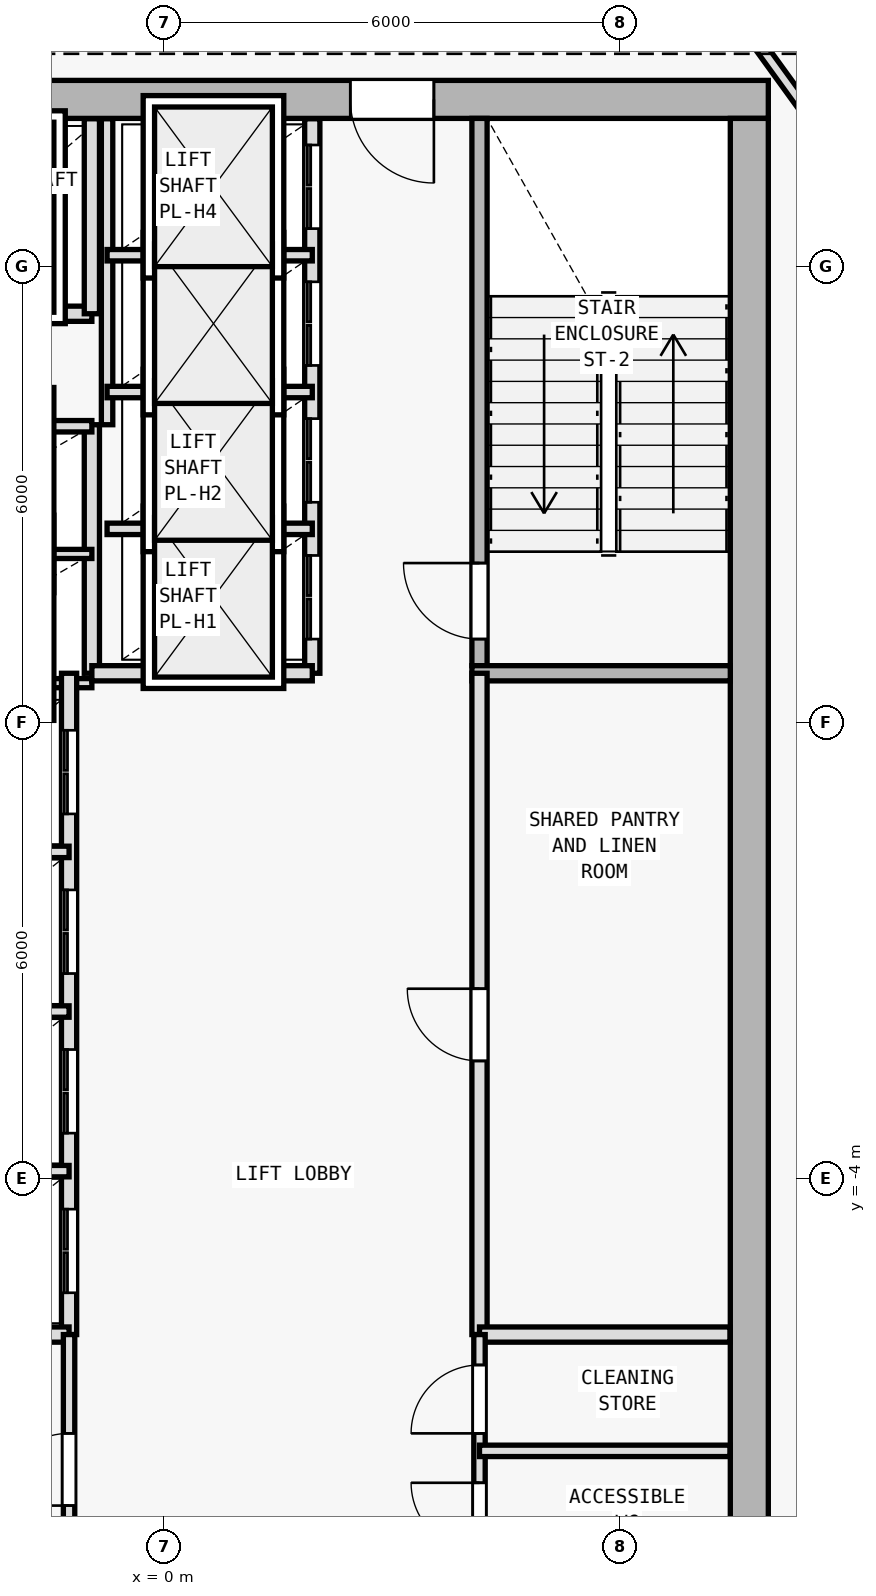
"""IFC4 building model, lengths in metres.
Left out: names, types, materials, properties, quantities, classifications, styles, units other than length and angle.
Written with IfcOpenShell. Run it as: python <this file> out.ifc"""

import sys

from ifc_helpers import new_model, si_unit, direction, frame, frame_2d, origin, origin_2d, place, context, subcontext, project, spatial, rectangle, i_section, extrude, element, fill, save


model = new_model("IFC4")
c1 = context("Model", 3, precision=1e-05, world=origin(), true_north=direction((0.0, 1.0)))
c2 = subcontext(c1, "Body", "Model", "MODEL_VIEW")
j1 = project(units=[si_unit("LENGTHUNIT", "METRE"), si_unit("PLANEANGLEUNIT", "RADIAN")], contexts=[c1])
p1 = place(None, origin())
s1 = spatial("IfcSite", under=j1, at=p1, CompositionType="ELEMENT")
p2 = place(p1, origin())
s2 = spatial("IfcBuilding", under=s1, at=p2, CompositionType="ELEMENT")
p3 = place(p2, frame((0.0, 0.0, 190.2)))
s3 = spatial("IfcBuildingStorey", under=s2, at=p3, CompositionType="ELEMENT", Elevation=190.2)
for number, where, z_axis, x_axis in (
    (1, (7.7, 10.2, 0.0), (0.0, 0.0, 1.0), (1.0, 0.0, 0.0)),
    (2, (7.7, 0.4, 0.0), (0.0, 0.0, 1.0), (1.0, 0.0, 0.0)),
):
    element("IfcColumn", number, at=place(p3, frame(where, z_axis=z_axis, x_axis=x_axis)), inside=s3, PredefinedType="COLUMN", context=c2, shape_type="SweptSolid", body=[
        extrude(i_section(OverallWidth=0.404, OverallDepth=0.407, WebThickness=0.017, FlangeThickness=0.028, FilletRadius=0.015, at=origin_2d()), origin(), (0.0, 0.0, 1.0), 4.5),
    ])
p4 = place(p3, frame((7.95, 10.2, 0.0), z_axis=(0.0, 0.0, 1.0), x_axis=(-1.0, 0.0, 0.0)))
e3 = element("IfcWall", 3, at=p4, inside=s3, PredefinedType="SHEAR", context=c2, shape_type="SweptSolid", body=[
    extrude(rectangle(XDim=15.9, YDim=0.5, at=frame_2d((7.95, 0.0))), origin(), (0.0, 0.0, 1.0), 4.25),
])
p5 = place(p4, frame((4.4, 0.0, 0.0)))
e4 = element("IfcOpeningElement", 4, at=p5, cuts=e3, PredefinedType="OPENING", context=c2, shape_type="SweptSolid", body=[
    extrude(rectangle(XDim=1.1, YDim=2.15, at=frame_2d((0.55, 1.075))), frame((0.0, 0.26, 0.0), z_axis=(0.0, -1.0, 0.0), x_axis=(1.0, 0.0, 0.0)), (0.0, 0.0, 1.0), 0.52),
])
p6 = place(p3, frame((7.7, 9.95, 0.0), z_axis=(0.0, 0.0, 1.0), x_axis=(0.0, -1.0, 0.0)))
e5 = element("IfcWall", 5, at=p6, inside=s3, PredefinedType="SHEAR", context=c2, shape_type="SweptSolid", body=[
    extrude(rectangle(XDim=19.1, YDim=0.5, at=frame_2d((9.55, 0.0))), origin(), (0.0, 0.0, 1.0), 4.25),
])
p7 = place(p3, frame((4.15, 2.75, 0.0), z_axis=(0.0, 0.0, 1.0), x_axis=(0.0, 1.0, 0.0)))
e6 = element("IfcWall", 6, at=p7, inside=s3, PredefinedType="SOLIDWALL", context=c2, shape_type="SweptSolid", body=[
    extrude(rectangle(XDim=7.2, YDim=0.2, at=frame_2d((3.6, 0.0))), origin(), (0.0, 0.0, 1.0), 4.25),
])
p8 = place(p7, frame((0.35, 0.0, 0.0)))
e7 = element("IfcOpeningElement", 7, at=p8, cuts=e6, PredefinedType="OPENING", context=c2, shape_type="SweptSolid", body=[
    extrude(rectangle(XDim=1.0, YDim=2.15, at=frame_2d((0.5, 1.075))), frame((0.0, 0.11, 0.0), z_axis=(0.0, -1.0, 0.0), x_axis=(1.0, 0.0, 0.0)), (0.0, 0.0, 1.0), 0.22),
])
p9 = place(p3, frame((4.05, 2.65, 0.0), z_axis=(0.0, 0.0, 1.0), x_axis=(1.0, 0.0, 0.0)))
e8 = element("IfcWall", 8, at=p9, inside=s3, PredefinedType="SOLIDWALL", context=c2, shape_type="SweptSolid", body=[
    extrude(rectangle(XDim=3.4, YDim=0.2, at=frame_2d((1.7, 0.0))), origin(), (0.0, 0.0, 1.0), 4.25),
])
p10 = place(p3, frame((-0.95, 2.65, 0.0), z_axis=(0.0, 0.0, 1.0), x_axis=(0.0, 1.0, 0.0)))
e9 = element("IfcWall", 9, at=p10, inside=s3, PredefinedType="SOLIDWALL", context=c2, shape_type="SweptSolid", body=[
    extrude(rectangle(XDim=3.27, YDim=0.2, at=frame_2d((1.635, 0.0))), origin(), (0.0, 0.0, 1.0), 4.25),
])
for number, where, z_axis, x_axis in (
    (10, (-3.85, 2.52, 0.0), (0.0, 0.0, 1.0), (1.0, 0.0, 0.0)),
    (11, (-3.85, 4.22, 0.0), (0.0, 0.0, 1.0), (1.0, 0.0, 0.0)),
):
    element("IfcWall", number, at=place(p3, frame(where, z_axis=z_axis, x_axis=x_axis)), inside=s3, PredefinedType="PARTITIONING", context=c2, shape_type="SweptSolid", body=[
        extrude(rectangle(XDim=2.9, YDim=0.12, at=frame_2d((1.45, 0.0))), origin(), (0.0, 0.0, 1.0), 4.25),
    ])
p11 = place(p3, frame((-3.85, 5.9, 0.0), z_axis=(0.0, 0.0, 1.0), x_axis=(1.0, 0.0, 0.0)))
e12 = element("IfcWall", 12, at=p11, inside=s3, PredefinedType="PARTITIONING", context=c2, shape_type="SweptSolid", body=[
    extrude(rectangle(XDim=2.9, YDim=0.15, at=frame_2d((1.45, 0.0))), origin(), (0.0, 0.0, 1.0), 4.25),
])
p12 = place(p3, frame((-3.85, 7.38, 0.0), z_axis=(0.0, 0.0, 1.0), x_axis=(1.0, 0.0, 0.0)))
e13 = element("IfcWall", 13, at=p12, inside=s3, PredefinedType="SOLIDWALL", context=c2, shape_type="SweptSolid", body=[
    extrude(rectangle(XDim=2.9, YDim=0.2, at=frame_2d((1.45, 0.0))), origin(), (0.0, 0.0, 1.0), 4.25),
])
p13 = place(p12, frame((0.85, 0.0, 0.0)))
e14 = element("IfcOpeningElement", 14, at=p13, cuts=e13, PredefinedType="OPENING", context=c2, shape_type="SweptSolid", body=[
    extrude(rectangle(XDim=1.2, YDim=2.2, at=frame_2d((0.6, 1.1))), frame((0.0, 0.11, 0.0), z_axis=(0.0, -1.0, 0.0), x_axis=(1.0, 0.0, 0.0)), (0.0, 0.0, 1.0), 0.22),
])
p14 = place(p3, frame((-0.95, 7.38, 0.0), z_axis=(0.0, 0.0, 1.0), x_axis=(0.0, 1.0, 0.0)))
e15 = element("IfcWall", 15, at=p14, inside=s3, PredefinedType="SOLIDWALL", context=c2, shape_type="SweptSolid", body=[
    extrude(rectangle(XDim=2.565, YDim=0.2, at=frame_2d((1.283, 0.0))), origin(), (0.0, 0.0, 1.0), 4.25),
])
p15 = place(p3, frame((4.15, -6.05, 0.0), z_axis=(0.0, 0.0, 1.0), x_axis=(0.0, 1.0, 0.0)))
e16 = element("IfcWall", 16, at=p15, inside=s3, PredefinedType="SOLIDWALL", context=c2, shape_type="SweptSolid", body=[
    extrude(rectangle(XDim=8.7, YDim=0.2, at=frame_2d((4.35, 0.0))), origin(), (0.0, 0.0, 1.0), 4.25),
])
p16 = place(p15, frame((3.6, 0.0, 0.0)))
e17 = element("IfcOpeningElement", 17, at=p16, cuts=e16, PredefinedType="OPENING", context=c2, shape_type="SweptSolid", body=[
    extrude(rectangle(XDim=0.95, YDim=2.1, at=frame_2d((0.475, 1.05))), frame((0.0, 0.11, 0.0), z_axis=(0.0, -1.0, 0.0), x_axis=(1.0, 0.0, 0.0)), (0.0, 0.0, 1.0), 0.22),
])
p17 = place(p3, frame((-1.25, -6.05, 0.0), z_axis=(0.0, 0.0, 1.0), x_axis=(0.0, 1.0, 0.0)))
e18 = element("IfcWall", 18, at=p17, inside=s3, PredefinedType="SOLIDWALL", context=c2, shape_type="SweptSolid", body=[
    extrude(rectangle(XDim=8.7, YDim=0.2, at=frame_2d((4.35, 0.0))), origin(), (0.0, 0.0, 1.0), 4.25),
])
p18 = place(p17, frame((0.55, 0.0, 0.0)))
e19 = element("IfcOpeningElement", 19, at=p18, cuts=e18, PredefinedType="OPENING", context=c2, shape_type="SweptSolid", body=[
    extrude(rectangle(XDim=1.1, YDim=2.15, at=frame_2d((0.55, 1.075))), frame((0.0, 0.11, 0.0), z_axis=(0.0, -1.0, 0.0), x_axis=(1.0, 0.0, 0.0)), (0.0, 0.0, 1.0), 0.22),
])
p19 = place(p17, frame((2.65, 0.0, 0.0)))
e20 = element("IfcOpeningElement", 20, at=p19, cuts=e18, PredefinedType="OPENING", context=c2, shape_type="SweptSolid", body=[
    extrude(rectangle(XDim=1.1, YDim=2.15, at=frame_2d((0.55, 1.075))), frame((0.0, 0.11, 0.0), z_axis=(0.0, -1.0, 0.0), x_axis=(1.0, 0.0, 0.0)), (0.0, 0.0, 1.0), 0.22),
])
p20 = place(p17, frame((4.75, 0.0, 0.0)))
e21 = element("IfcOpeningElement", 21, at=p20, cuts=e18, PredefinedType="OPENING", context=c2, shape_type="SweptSolid", body=[
    extrude(rectangle(XDim=1.1, YDim=2.15, at=frame_2d((0.55, 1.075))), frame((0.0, 0.11, 0.0), z_axis=(0.0, -1.0, 0.0), x_axis=(1.0, 0.0, 0.0)), (0.0, 0.0, 1.0), 0.22),
])
p21 = place(p17, frame((6.85, 0.0, 0.0)))
e22 = element("IfcOpeningElement", 22, at=p21, cuts=e18, PredefinedType="OPENING", context=c2, shape_type="SweptSolid", body=[
    extrude(rectangle(XDim=1.1, YDim=2.15, at=frame_2d((0.55, 1.075))), frame((0.0, 0.11, 0.0), z_axis=(0.0, -1.0, 0.0), x_axis=(1.0, 0.0, 0.0)), (0.0, 0.0, 1.0), 0.22),
])
for number, where, z_axis, x_axis in (
    (23, (-4.15, -3.9, 0.0), (0.0, 0.0, 1.0), (1.0, 0.0, 0.0)),
    (24, (-4.15, -1.8, 0.0), (0.0, 0.0, 1.0), (1.0, 0.0, 0.0)),
    (25, (-4.15, 0.3, 0.0), (0.0, 0.0, 1.0), (1.0, 0.0, 0.0)),
):
    element("IfcWall", number, at=place(p3, frame(where, z_axis=z_axis, x_axis=x_axis)), inside=s3, PredefinedType="PARTITIONING", context=c2, shape_type="SweptSolid", body=[
        extrude(rectangle(XDim=2.9, YDim=0.15, at=frame_2d((1.45, 0.0))), origin(), (0.0, 0.0, 1.0), 4.25),
    ])
p22 = place(p3, frame((1.95, 2.65, 0.0), z_axis=(0.0, 0.0, 1.0), x_axis=(0.0, 1.0, 0.0)))
e26 = element("IfcWall", 26, at=p22, inside=s3, PredefinedType="SOLIDWALL", context=c2, shape_type="SweptSolid", body=[
    extrude(rectangle(XDim=7.295, YDim=0.2, at=frame_2d((3.647, 0.0))), origin(), (0.0, 0.0, 1.0), 4.25),
])
p23 = place(p22, frame((0.45, 0.0, 0.0)))
e27 = element("IfcOpeningElement", 27, at=p23, cuts=e26, PredefinedType="OPENING", context=c2, shape_type="SweptSolid", body=[
    extrude(rectangle(XDim=1.1, YDim=2.15, at=frame_2d((0.55, 1.075))), frame((0.0, 0.11, 0.0), z_axis=(0.0, -1.0, 0.0), x_axis=(1.0, 0.0, 0.0)), (0.0, 0.0, 1.0), 0.22),
])
p24 = place(p22, frame((2.25, 0.0, 0.0)))
e28 = element("IfcOpeningElement", 28, at=p24, cuts=e26, PredefinedType="OPENING", context=c2, shape_type="SweptSolid", body=[
    extrude(rectangle(XDim=1.1, YDim=2.15, at=frame_2d((0.55, 1.075))), frame((0.0, 0.11, 0.0), z_axis=(0.0, -1.0, 0.0), x_axis=(1.0, 0.0, 0.0)), (0.0, 0.0, 1.0), 0.22),
])
p25 = place(p22, frame((4.05, 0.0, 0.0)))
e29 = element("IfcOpeningElement", 29, at=p25, cuts=e26, PredefinedType="OPENING", context=c2, shape_type="SweptSolid", body=[
    extrude(rectangle(XDim=1.1, YDim=2.15, at=frame_2d((0.55, 1.075))), frame((0.0, 0.11, 0.0), z_axis=(0.0, -1.0, 0.0), x_axis=(1.0, 0.0, 0.0)), (0.0, 0.0, 1.0), 0.22),
])
p26 = place(p22, frame((5.85, 0.0, 0.0)))
e30 = element("IfcOpeningElement", 30, at=p26, cuts=e26, PredefinedType="OPENING", context=c2, shape_type="SweptSolid", body=[
    extrude(rectangle(XDim=1.1, YDim=2.15, at=frame_2d((0.55, 1.075))), frame((0.0, 0.11, 0.0), z_axis=(0.0, -1.0, 0.0), x_axis=(1.0, 0.0, 0.0)), (0.0, 0.0, 1.0), 0.22),
])
p27 = place(p3, frame((-0.95, 2.65, 0.0), z_axis=(0.0, 0.0, 1.0), x_axis=(1.0, 0.0, 0.0)))
e31 = element("IfcWall", 31, at=p27, inside=s3, PredefinedType="SOLIDWALL", context=c2, shape_type="SweptSolid", body=[
    extrude(rectangle(XDim=2.9, YDim=0.2, at=frame_2d((1.45, 0.0))), origin(), (0.0, 0.0, 1.0), 4.25),
])
p28 = place(p3, frame((-0.75, 5.92, 0.0), z_axis=(0.0, 0.0, 1.0), x_axis=(0.0, 1.0, 0.0)))
e32 = element("IfcWall", 32, at=p28, inside=s3, PredefinedType="PARTITIONING", context=c2, shape_type="SweptSolid", body=[
    extrude(rectangle(XDim=4.025, YDim=0.15, at=frame_2d((2.013, 0.0))), origin(), (0.0, 0.0, 1.0), 4.25),
])
for number, where, z_axis, x_axis in (
    (33, (-0.75, 4.55, 0.0), (0.0, 0.0, 1.0), (1.0, 0.0, 0.0)),
    (34, (-0.75, 6.35, 0.0), (0.0, 0.0, 1.0), (1.0, 0.0, 0.0)),
    (35, (-0.75, 8.15, 0.0), (0.0, 0.0, 1.0), (1.0, 0.0, 0.0)),
):
    element("IfcWall", number, at=place(p3, frame(where, z_axis=z_axis, x_axis=x_axis)), inside=s3, PredefinedType="PARTITIONING", context=c2, shape_type="SweptSolid", body=[
        extrude(rectangle(XDim=2.7, YDim=0.15, at=frame_2d((1.35, 0.0))), origin(), (0.0, 0.0, 1.0), 4.25),
    ])
p29 = place(p3, frame((-4.04, -6.05, 0.0), z_axis=(0.0, 0.0, 1.0), x_axis=(1.0, 0.0, 0.0)))
e36 = element("IfcWall", 36, at=p29, inside=s3, PredefinedType="SOLIDWALL", context=c2, shape_type="SweptSolid", body=[
    extrude(rectangle(XDim=2.79, YDim=0.2, at=frame_2d((1.395, 0.0))), origin(), (0.0, 0.0, 1.0), 4.25),
])
p30 = place(p3, frame((4.15, -6.05, 0.0), z_axis=(0.0, 0.0, 1.0), x_axis=(1.0, 0.0, 0.0)))
e37 = element("IfcWall", 37, at=p30, inside=s3, PredefinedType="SOLIDWALL", context=c2, shape_type="SweptSolid", body=[
    extrude(rectangle(XDim=3.295, YDim=0.2, at=frame_2d((1.647, 0.0))), origin(), (0.0, 0.0, 1.0), 4.25),
])
p31 = place(p3, frame((-1.25, -9.145, 0.0), z_axis=(0.0, 0.0, 1.0), x_axis=(0.0, 1.0, 0.0)))
e38 = element("IfcWall", 38, at=p31, inside=s3, PredefinedType="PARTITIONING", context=c2, shape_type="SweptSolid", body=[
    extrude(rectangle(XDim=3.095, YDim=0.15, at=frame_2d((1.547, 0.0))), origin(), (0.0, 0.0, 1.0), 4.25),
])
p32 = place(p31, frame((0.845, 0.0, 0.0)))
e39 = element("IfcOpeningElement", 39, at=p32, cuts=e38, PredefinedType="OPENING", context=c2, shape_type="SweptSolid", body=[
    extrude(rectangle(XDim=0.95, YDim=2.1, at=frame_2d((0.475, 1.05))), frame((0.0, 0.085, 0.0), z_axis=(0.0, -1.0, 0.0), x_axis=(1.0, 0.0, 0.0)), (0.0, 0.0, 1.0), 0.17),
])
p33 = place(p3, frame((4.15, -9.145, 0.0), z_axis=(0.0, 0.0, 1.0), x_axis=(0.0, 1.0, 0.0)))
e40 = element("IfcWall", 40, at=p33, inside=s3, PredefinedType="PARTITIONING", context=c2, shape_type="SweptSolid", body=[
    extrude(rectangle(XDim=3.095, YDim=0.15, at=frame_2d((1.547, 0.0))), origin(), (0.0, 0.0, 1.0), 4.25),
])
p34 = place(p33, frame((0.245, 0.0, 0.0)))
e41 = element("IfcOpeningElement", 41, at=p34, cuts=e40, PredefinedType="OPENING", context=c2, shape_type="SweptSolid", body=[
    extrude(rectangle(XDim=0.9, YDim=2.1, at=frame_2d((0.45, 1.05))), frame((0.0, 0.085, 0.0), z_axis=(0.0, -1.0, 0.0), x_axis=(1.0, 0.0, 0.0)), (0.0, 0.0, 1.0), 0.17),
])
p35 = place(p33, frame((1.795, 0.0, 0.0)))
e42 = element("IfcOpeningElement", 42, at=p35, cuts=e40, PredefinedType="OPENING", context=c2, shape_type="SweptSolid", body=[
    extrude(rectangle(XDim=0.9, YDim=2.1, at=frame_2d((0.45, 1.05))), frame((0.0, 0.085, 0.0), z_axis=(0.0, -1.0, 0.0), x_axis=(1.0, 0.0, 0.0)), (0.0, 0.0, 1.0), 0.17),
])
p36 = place(p3, frame((4.15, -7.58, 0.0), z_axis=(0.0, 0.0, 1.0), x_axis=(1.0, 0.0, 0.0)))
e43 = element("IfcWall", 43, at=p36, inside=s3, PredefinedType="PARTITIONING", context=c2, shape_type="SweptSolid", body=[
    extrude(rectangle(XDim=3.295, YDim=0.15, at=frame_2d((1.647, 0.0))), origin(), (0.0, 0.0, 1.0), 4.25),
])
p37 = place(p3, frame((6.841, 12.28, 0.0), z_axis=(0.0, 0.0, 1.0), x_axis=(0.586956386413, -0.809618552436, 0.0)))
e44 = element("IfcWall", 44, at=p37, inside=s3, PredefinedType="PARTITIONING", context=c2, shape_type="SweptSolid", body=[
    extrude(rectangle(XDim=5.008, YDim=0.15, at=frame_2d((2.504, 0.0))), origin(), (0.0, 0.0, 1.0), 3.775),
])
p38 = place(p5, origin())
e45 = element("IfcDoor", 45, at=p38, inside=s3, OperationType="SINGLE_SWING_LEFT", PredefinedType="DOOR", context=c2, shape_type="SweptSolid", body=[
    extrude(rectangle(XDim=1.1, YDim=2.15, at=frame_2d((0.55, 1.075))), frame((0.0, 0.025, 0.0), z_axis=(0.0, -1.0, 0.0), x_axis=(1.0, 0.0, 0.0)), (0.0, 0.0, 1.0), 0.05),
])
fill(e4, e45)
p39 = place(p8, origin())
e46 = element("IfcDoor", 46, at=p39, inside=s3, OperationType="SINGLE_SWING_RIGHT", PredefinedType="DOOR", context=c2, shape_type="SweptSolid", body=[
    extrude(rectangle(XDim=1.0, YDim=2.15, at=frame_2d((0.5, 1.075))), frame((0.0, 0.025, 0.0), z_axis=(0.0, -1.0, 0.0), x_axis=(1.0, 0.0, 0.0)), (0.0, 0.0, 1.0), 0.05),
])
fill(e7, e46)
p40 = place(p16, origin())
e47 = element("IfcDoor", 47, at=p40, inside=s3, OperationType="SINGLE_SWING_RIGHT", PredefinedType="DOOR", context=c2, shape_type="SweptSolid", body=[
    extrude(rectangle(XDim=0.95, YDim=2.1, at=frame_2d((0.475, 1.05))), frame((0.0, 0.025, 0.0), z_axis=(0.0, -1.0, 0.0), x_axis=(1.0, 0.0, 0.0)), (0.0, 0.0, 1.0), 0.05),
])
fill(e17, e47)
p41 = place(p18, origin())
e48 = element("IfcDoor", 48, at=p41, inside=s3, OperationType="DOUBLE_DOOR_SLIDING", PredefinedType="DOOR", context=c2, shape_type="SweptSolid", body=[
    extrude(rectangle(XDim=1.1, YDim=2.15, at=frame_2d((0.55, 1.075))), frame((0.0, 0.025, 0.0), z_axis=(0.0, -1.0, 0.0), x_axis=(1.0, 0.0, 0.0)), (0.0, 0.0, 1.0), 0.05),
])
fill(e19, e48)
p42 = place(p19, origin())
e49 = element("IfcDoor", 49, at=p42, inside=s3, OperationType="DOUBLE_DOOR_SLIDING", PredefinedType="DOOR", context=c2, shape_type="SweptSolid", body=[
    extrude(rectangle(XDim=1.1, YDim=2.15, at=frame_2d((0.55, 1.075))), frame((0.0, 0.025, 0.0), z_axis=(0.0, -1.0, 0.0), x_axis=(1.0, 0.0, 0.0)), (0.0, 0.0, 1.0), 0.05),
])
fill(e20, e49)
p43 = place(p20, origin())
e50 = element("IfcDoor", 50, at=p43, inside=s3, OperationType="DOUBLE_DOOR_SLIDING", PredefinedType="DOOR", context=c2, shape_type="SweptSolid", body=[
    extrude(rectangle(XDim=1.1, YDim=2.15, at=frame_2d((0.55, 1.075))), frame((0.0, 0.025, 0.0), z_axis=(0.0, -1.0, 0.0), x_axis=(1.0, 0.0, 0.0)), (0.0, 0.0, 1.0), 0.05),
])
fill(e21, e50)
p44 = place(p21, origin())
e51 = element("IfcDoor", 51, at=p44, inside=s3, OperationType="DOUBLE_DOOR_SLIDING", PredefinedType="DOOR", context=c2, shape_type="SweptSolid", body=[
    extrude(rectangle(XDim=1.1, YDim=2.15, at=frame_2d((0.55, 1.075))), frame((0.0, 0.025, 0.0), z_axis=(0.0, -1.0, 0.0), x_axis=(1.0, 0.0, 0.0)), (0.0, 0.0, 1.0), 0.05),
])
fill(e22, e51)
p45 = place(p23, origin())
e52 = element("IfcDoor", 52, at=p45, inside=s3, OperationType="DOUBLE_DOOR_SLIDING", PredefinedType="DOOR", context=c2, shape_type="SweptSolid", body=[
    extrude(rectangle(XDim=1.1, YDim=2.15, at=frame_2d((0.55, 1.075))), frame((0.0, 0.025, 0.0), z_axis=(0.0, -1.0, 0.0), x_axis=(1.0, 0.0, 0.0)), (0.0, 0.0, 1.0), 0.05),
])
fill(e27, e52)
p46 = place(p24, origin())
e53 = element("IfcDoor", 53, at=p46, inside=s3, OperationType="DOUBLE_DOOR_SLIDING", PredefinedType="DOOR", context=c2, shape_type="SweptSolid", body=[
    extrude(rectangle(XDim=1.1, YDim=2.15, at=frame_2d((0.55, 1.075))), frame((0.0, 0.025, 0.0), z_axis=(0.0, -1.0, 0.0), x_axis=(1.0, 0.0, 0.0)), (0.0, 0.0, 1.0), 0.05),
])
fill(e28, e53)
p47 = place(p25, origin())
e54 = element("IfcDoor", 54, at=p47, inside=s3, OperationType="DOUBLE_DOOR_SLIDING", PredefinedType="DOOR", context=c2, shape_type="SweptSolid", body=[
    extrude(rectangle(XDim=1.1, YDim=2.15, at=frame_2d((0.55, 1.075))), frame((0.0, 0.025, 0.0), z_axis=(0.0, -1.0, 0.0), x_axis=(1.0, 0.0, 0.0)), (0.0, 0.0, 1.0), 0.05),
])
fill(e29, e54)
p48 = place(p26, origin())
e55 = element("IfcDoor", 55, at=p48, inside=s3, OperationType="DOUBLE_DOOR_SLIDING", PredefinedType="DOOR", context=c2, shape_type="SweptSolid", body=[
    extrude(rectangle(XDim=1.1, YDim=2.15, at=frame_2d((0.55, 1.075))), frame((0.0, 0.025, 0.0), z_axis=(0.0, -1.0, 0.0), x_axis=(1.0, 0.0, 0.0)), (0.0, 0.0, 1.0), 0.05),
])
fill(e30, e55)
p49 = place(p32, origin())
e56 = element("IfcDoor", 56, at=p49, inside=s3, OperationType="SINGLE_SWING_LEFT", PredefinedType="DOOR", context=c2, shape_type="SweptSolid", body=[
    extrude(rectangle(XDim=0.95, YDim=2.1, at=frame_2d((0.475, 1.05))), frame((0.0, 0.025, 0.0), z_axis=(0.0, -1.0, 0.0), x_axis=(1.0, 0.0, 0.0)), (0.0, 0.0, 1.0), 0.05),
])
fill(e39, e56)
p50 = place(p34, origin())
e57 = element("IfcDoor", 57, at=p50, inside=s3, OperationType="SINGLE_SWING_RIGHT", PredefinedType="DOOR", context=c2, shape_type="SweptSolid", body=[
    extrude(rectangle(XDim=0.9, YDim=2.1, at=frame_2d((0.45, 1.05))), frame((0.0, 0.025, 0.0), z_axis=(0.0, -1.0, 0.0), x_axis=(1.0, 0.0, 0.0)), (0.0, 0.0, 1.0), 0.05),
])
fill(e41, e57)
p51 = place(p35, origin())
e58 = element("IfcDoor", 58, at=p51, inside=s3, OperationType="SINGLE_SWING_LEFT", PredefinedType="DOOR", context=c2, shape_type="SweptSolid", body=[
    extrude(rectangle(XDim=0.9, YDim=2.1, at=frame_2d((0.45, 1.05))), frame((0.0, 0.025, 0.0), z_axis=(0.0, -1.0, 0.0), x_axis=(1.0, 0.0, 0.0)), (0.0, 0.0, 1.0), 0.05),
])
fill(e42, e58)
save(model, sys.argv[1])
